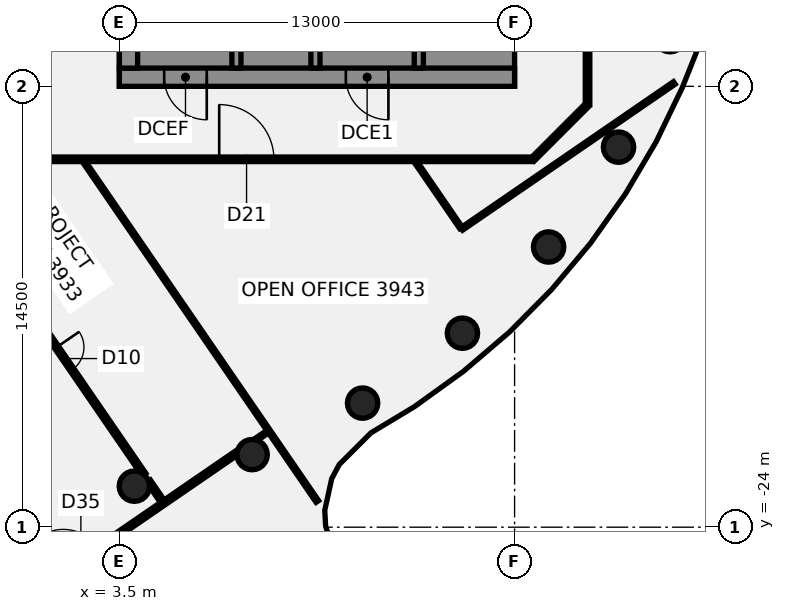
"""IFC4 building model, lengths in metres.
Left out: names, types, materials, properties, quantities, classifications, styles, units other than length and angle.
Written with IfcOpenShell. Run it as: python <this file> out.ifc"""

import sys

from ifc_helpers import new_model, si_unit, direction, frame, frame_2d, origin, origin_2d, place, context, subcontext, project, spatial, polyline, rectangle, circle, outline, extrude, element, fill, save


model = new_model("IFC4")
c1 = context("Model", 3, precision=1e-05, world=origin(), true_north=direction((0.0, 1.0)))
c2 = subcontext(c1, "Body", "Model", "MODEL_VIEW")
j1 = project(units=[si_unit("LENGTHUNIT", "METRE"), si_unit("PLANEANGLEUNIT", "RADIAN")], contexts=[c1])
p1 = place(None, origin())
s1 = spatial("IfcSite", under=j1, at=p1, CompositionType="ELEMENT")
p2 = place(p1, origin())
s2 = spatial("IfcBuilding", under=s1, at=p2, CompositionType="ELEMENT")
p3 = place(p2, frame((0.0, 0.0, 159.25)))
s3 = spatial("IfcBuildingStorey", under=s2, at=p3, CompositionType="ELEMENT", Elevation=159.25)
for number, where, z_axis, x_axis in (
    (1, (3.994, -22.651, -0.14), (0.0, 0.0, 1.0), (1.0, 0.0, 0.0)),
    (2, (7.866, -21.613, -0.14), (0.0, 0.0, 1.0), (1.0, 0.0, 0.0)),
    (3, (11.5, -19.919, -0.14), (0.0, 0.0, 1.0), (1.0, 0.0, 0.0)),
    (4, (14.784, -17.619, -0.14), (0.0, 0.0, 1.0), (1.0, 0.0, 0.0)),
    (5, (17.619, -14.784, -0.14), (0.0, 0.0, 1.0), (1.0, 0.0, 0.0)),
    (6, (19.919, -11.5, -0.14), (0.0, 0.0, 1.0), (1.0, 0.0, 0.0)),
):
    element("IfcColumn", number, at=place(p3, frame(where, z_axis=z_axis, x_axis=x_axis)), inside=s3, PredefinedType="COLUMN", context=c2, shape_type="SweptSolid", body=[
        extrude(circle(Radius=0.5, at=origin_2d()), origin(), (0.0, 0.0, 1.0), 3.75),
    ])
p4 = place(p3, frame((-2.743, -11.999, 0.0), z_axis=(0.0, 0.0, 1.0), x_axis=(0.566083821622, -0.824347685687, 0.0)))
e7 = element("IfcWall", 7, at=p4, inside=s3, PredefinedType="PARTITIONING", context=c2, shape_type="SweptSolid", body=[
    extrude(rectangle(XDim=12.459, YDim=0.15, at=frame_2d((6.229, 0.0))), origin(), (0.0, 0.0, 1.0), 3.01),
])
p5 = place(p4, frame((7.38, 0.0, 0.0)))
e8 = element("IfcOpeningElement", 8, at=p5, cuts=e7, PredefinedType="OPENING", context=c2, shape_type="SweptSolid", body=[
    extrude(rectangle(XDim=0.9, YDim=2.1, at=frame_2d((0.45, 1.05))), frame((0.0, 0.085, 0.0), z_axis=(0.0, -1.0, 0.0), x_axis=(1.0, 0.0, 0.0)), (0.0, 0.0, 1.0), 0.17),
])
p6 = place(p3, frame((4.461, -22.49, 0.0), z_axis=(0.0, 0.0, 1.0), x_axis=(0.566109769755, -0.824329866369, 0.0)))
e9 = element("IfcWall", 9, at=p6, inside=s3, PredefinedType="PARTITIONING", context=c2, shape_type="SweptSolid", body=[
    extrude(rectangle(XDim=0.791, YDim=0.15, at=frame_2d((0.396, 0.0))), origin(), (0.0, 0.0, 1.0), 3.01),
])
p7 = place(p3, frame((2.344, -11.987, 0.0), z_axis=(0.0, 0.0, 1.0), x_axis=(0.566059881592, -0.824364124918, 0.0)))
e10 = element("IfcWall", 10, at=p7, inside=s3, PredefinedType="PARTITIONING", context=c2, shape_type="SweptSolid", body=[
    extrude(rectangle(XDim=13.547, YDim=0.1, at=frame_2d((6.773, 0.0))), origin(), (0.0, 0.0, 1.0), 3.01),
])
p8 = place(p3, frame((13.249, -11.987, 0.0), z_axis=(0.0, 0.0, 1.0), x_axis=(0.566181157167, -0.824280836408, 0.0)))
e11 = element("IfcWall", 11, at=p8, inside=s3, PredefinedType="PARTITIONING", context=c2, shape_type="SweptSolid", body=[
    extrude(rectangle(XDim=2.623, YDim=0.1, at=frame_2d((1.312, 0.0))), origin(), (0.0, 0.0, 1.0), 3.01),
])
p9 = place(p3, frame((-17.1, -11.9, 0.0), z_axis=(0.0, 0.0, 1.0), x_axis=(1.0, 0.0, 0.0)))
e12 = element("IfcWall", 12, at=p9, inside=s3, PredefinedType="PARTITIONING", context=c2, shape_type="SweptSolid", body=[
    extrude(rectangle(XDim=34.165, YDim=0.15, at=frame_2d((17.083, 0.0))), origin(), (0.0, 0.0, 1.0), 3.01),
])
p10 = place(p9, frame((9.777, 0.0, 0.0)))
e13 = element("IfcOpeningElement", 13, at=p10, cuts=e12, PredefinedType="OPENING", context=c2, shape_type="SweptSolid", body=[
    extrude(rectangle(XDim=1.8, YDim=2.1, at=frame_2d((0.9, 1.05))), frame((0.0, 0.085, 0.0), z_axis=(0.0, -1.0, 0.0), x_axis=(1.0, 0.0, 0.0)), (0.0, 0.0, 1.0), 0.17),
])
p11 = place(p9, frame((1.95, 0.0, 0.0)))
e14 = element("IfcOpeningElement", 14, at=p11, cuts=e12, PredefinedType="OPENING", context=c2, shape_type="SweptSolid", body=[
    extrude(rectangle(XDim=1.8, YDim=2.1, at=frame_2d((0.9, 1.05))), frame((0.0, 0.085, 0.0), z_axis=(0.0, -1.0, 0.0), x_axis=(1.0, 0.0, 0.0)), (0.0, 0.0, 1.0), 0.17),
])
p12 = place(p9, frame((23.884, 0.0, 0.0)))
e15 = element("IfcOpeningElement", 15, at=p12, cuts=e12, PredefinedType="OPENING", context=c2, shape_type="SweptSolid", body=[
    extrude(rectangle(XDim=1.8, YDim=2.1, at=frame_2d((0.9, 1.05))), frame((0.0, 0.085, 0.0), z_axis=(0.0, -1.0, 0.0), x_axis=(1.0, 0.0, 0.0)), (0.0, 0.0, 1.0), 0.17),
])
p13 = place(p3, frame((-3.371, -28.925, 0.0), z_axis=(0.0, 0.0, 1.0), x_axis=(0.82439699271, 0.566012012603, 0.0)))
e16 = element("IfcWall", 16, at=p13, inside=s3, PredefinedType="PARTITIONING", context=c2, shape_type="SweptSolid", body=[
    extrude(rectangle(XDim=13.034, YDim=0.15, at=frame_2d((6.517, 0.0))), origin(), (0.0, 0.0, 1.0), 3.01),
])
p14 = place(p13, frame((6.099, 0.0, 0.0)))
e17 = element("IfcOpeningElement", 17, at=p14, cuts=e16, PredefinedType="OPENING", context=c2, shape_type="SweptSolid", body=[
    extrude(rectangle(XDim=1.4, YDim=2.1, at=frame_2d((0.7, 1.05))), frame((0.0, 0.085, 0.0), z_axis=(0.0, -1.0, 0.0), x_axis=(1.0, 0.0, 0.0)), (0.0, 0.0, 1.0), 0.17),
])
p15 = place(p3, frame((7.977, -21.133, 0.0), z_axis=(0.0, 0.0, 1.0), x_axis=(0.824587344579, 0.565734664981, 0.0)))
e18 = element("IfcWall", 18, at=p15, inside=s3, PredefinedType="PARTITIONING", context=c2, shape_type="SweptSolid", body=[
    extrude(rectangle(XDim=0.483, YDim=0.1, at=frame_2d((0.241, 0.0))), origin(), (0.0, 0.0, 1.0), 3.01),
])
p16 = place(p3, frame((14.762, -14.19, 0.0), z_axis=(0.0, 0.0, 1.0), x_axis=(0.824347457756, 0.566084153542, 0.0)))
e19 = element("IfcWall", 19, at=p16, inside=s3, PredefinedType="PARTITIONING", context=c2, shape_type="SweptSolid", body=[
    extrude(rectangle(XDim=8.483, YDim=0.1, at=frame_2d((4.242, 0.0))), origin(), (0.0, 0.0, 1.0), 3.01),
])
p17 = place(p3, frame((17.1, -11.9, 0.0), z_axis=(0.0, 0.0, 1.0), x_axis=(0.707106781187, 0.707106781187, 0.0)))
e20 = element("IfcWall", 20, at=p17, inside=s3, PredefinedType="PARTITIONING", context=c2, shape_type="SweptSolid", body=[
    extrude(rectangle(XDim=2.505, YDim=0.15, at=frame_2d((1.253, 0.0))), origin(), (0.0, 0.0, 1.0), 3.01),
])
p18 = place(p3, frame((18.9, -10.1, 0.0), z_axis=(0.0, 0.0, 1.0), x_axis=(0.0, 1.0, 0.0)))
e21 = element("IfcWall", 21, at=p18, inside=s3, PredefinedType="PARTITIONING", context=c2, shape_type="SweptSolid", body=[
    extrude(rectangle(XDim=20.2, YDim=0.15, at=frame_2d((10.1, 0.0))), origin(), (0.0, 0.0, 1.0), 3.01),
])
p19 = place(p18, frame((8.047, 0.0, 0.0)))
e22 = element("IfcOpeningElement", 22, at=p19, cuts=e21, PredefinedType="OPENING", context=c2, shape_type="SweptSolid", body=[
    extrude(rectangle(XDim=1.8, YDim=2.1, at=frame_2d((0.9, 1.05))), frame((0.0, 0.085, 0.0), z_axis=(0.0, -1.0, 0.0), x_axis=(1.0, 0.0, 0.0)), (0.0, 0.0, 1.0), 0.17),
])
p20 = place(p18, frame((13.596, 0.0, 0.0)))
e23 = element("IfcOpeningElement", 23, at=p20, cuts=e21, PredefinedType="OPENING", context=c2, shape_type="SweptSolid", body=[
    extrude(rectangle(XDim=0.9, YDim=2.1, at=frame_2d((0.45, 1.05))), frame((0.0, 0.085, 0.0), z_axis=(0.0, -1.0, 0.0), x_axis=(1.0, 0.0, 0.0)), (0.0, 0.0, 1.0), 0.17),
])
p21 = place(p3, frame((16.5, -9.2, 0.0), z_axis=(0.0, 0.0, 1.0), x_axis=(-1.0, 0.0, 0.0)))
e24 = element("IfcWall", 24, at=p21, inside=s3, PredefinedType="SHEAR", context=c2, shape_type="SweptSolid", body=[
    extrude(rectangle(XDim=13.0, YDim=0.6, at=frame_2d((6.5, 0.0))), origin(), (0.0, 0.0, 1.0), 3.61),
])
p22 = place(p21, frame((4.15, 0.0, 0.0)))
e25 = element("IfcOpeningElement", 25, at=p22, cuts=e24, PredefinedType="OPENING", context=c2, shape_type="SweptSolid", body=[
    extrude(rectangle(XDim=1.4, YDim=2.1, at=frame_2d((0.7, 1.05))), frame((0.0, 0.31, 0.0), z_axis=(0.0, -1.0, 0.0), x_axis=(1.0, 0.0, 0.0)), (0.0, 0.0, 1.0), 0.62),
])
p23 = place(p21, frame((10.125, 0.0, 0.0)))
e26 = element("IfcOpeningElement", 26, at=p23, cuts=e24, PredefinedType="OPENING", context=c2, shape_type="SweptSolid", body=[
    extrude(rectangle(XDim=1.4, YDim=2.1, at=frame_2d((0.7, 1.05))), frame((0.0, 0.31, 0.0), z_axis=(0.0, -1.0, 0.0), x_axis=(1.0, 0.0, 0.0)), (0.0, 0.0, 1.0), 0.62),
])
p24 = place(p3, origin())
e27 = element("IfcWall", 27, at=p24, inside=s3, PredefinedType="SHEAR", context=c2, shape_type="SweptSolid", body=[
    extrude(outline(polyline([(13.5, -8.125), (13.5, -8.9), (15.9, -8.9), (16.5, -8.9), (16.5, 8.9), (15.9, 8.9), (13.5, 8.9), (13.5, 8.125), (15.9, 8.125), (15.9, 5.625), (13.5, 5.625), (13.5, 5.375), (15.9, 5.375), (15.9, -5.375), (13.5, -5.375), (13.5, -5.625), (15.9, -5.625), (15.9, -8.125), (13.5, -8.125)])), origin(), (0.0, 0.0, 1.0), 3.61),
])
p25 = place(p3, origin())
e28 = element("IfcWall", 28, at=p25, inside=s3, PredefinedType="SHEAR", context=c2, shape_type="SweptSolid", body=[
    extrude(outline(polyline([(7.5, -8.125), (7.5, -8.9), (9.8, -8.9), (9.8, -8.125), (9.8, -5.625), (9.55, -5.625), (9.55, -8.125), (7.5, -8.125)])), origin(), (0.0, 0.0, 1.0), 3.61),
])
p26 = place(p3, frame((7.35, -8.9, 0.0), z_axis=(0.0, 0.0, 1.0), x_axis=(0.0, 1.0, 0.0)))
e29 = element("IfcWall", 29, at=p26, inside=s3, PredefinedType="SHEAR", context=c2, shape_type="SweptSolid", body=[
    extrude(rectangle(XDim=0.775, YDim=0.3, at=frame_2d((0.387, 0.0))), origin(), (0.0, 0.0, 1.0), 3.61),
])
p27 = place(p3, frame((13.35, -8.9, 0.0), z_axis=(0.0, 0.0, 1.0), x_axis=(0.0, 1.0, 0.0)))
e30 = element("IfcWall", 30, at=p27, inside=s3, PredefinedType="SHEAR", context=c2, shape_type="SweptSolid", body=[
    extrude(rectangle(XDim=17.8, YDim=0.3, at=frame_2d((8.9, 0.0))), origin(), (0.0, 0.0, 1.0), 3.61),
])
p28 = place(p27, frame((1.325, 0.0, 0.0)))
e31 = element("IfcOpeningElement", 31, at=p28, cuts=e30, PredefinedType="OPENING", context=c2, shape_type="SweptSolid", body=[
    extrude(rectangle(XDim=1.4, YDim=2.1, at=frame_2d((0.7, 1.05))), frame((0.0, 0.16, 0.0), z_axis=(0.0, -1.0, 0.0), x_axis=(1.0, 0.0, 0.0)), (0.0, 0.0, 1.0), 0.32),
])
p29 = place(p27, frame((4.754, 0.0, 0.0)))
e32 = element("IfcOpeningElement", 32, at=p29, cuts=e30, PredefinedType="OPENING", context=c2, shape_type="SweptSolid", body=[
    extrude(rectangle(XDim=1.0, YDim=2.1, at=frame_2d((0.5, 1.05))), frame((0.0, 0.16, 0.0), z_axis=(0.0, -1.0, 0.0), x_axis=(1.0, 0.0, 0.0)), (0.0, 0.0, 1.0), 0.32),
])
p30 = place(p27, frame((10.254, 0.0, 0.0)))
e33 = element("IfcOpeningElement", 33, at=p30, cuts=e30, PredefinedType="OPENING", context=c2, shape_type="SweptSolid", body=[
    extrude(rectangle(XDim=1.0, YDim=2.1, at=frame_2d((0.5, 1.05))), frame((0.0, 0.16, 0.0), z_axis=(0.0, -1.0, 0.0), x_axis=(1.0, 0.0, 0.0)), (0.0, 0.0, 1.0), 0.32),
])
p31 = place(p3, frame((9.95, -8.9, 0.0), z_axis=(0.0, 0.0, 1.0), x_axis=(0.0, 1.0, 0.0)))
e34 = element("IfcWall", 34, at=p31, inside=s3, PredefinedType="SHEAR", context=c2, shape_type="SweptSolid", body=[
    extrude(rectangle(XDim=17.8, YDim=0.3, at=frame_2d((8.9, 0.0))), origin(), (0.0, 0.0, 1.0), 3.61),
])
p32 = place(p31, frame((4.175, 0.0, 0.0)))
e35 = element("IfcOpeningElement", 35, at=p32, cuts=e34, PredefinedType="OPENING", context=c2, shape_type="SweptSolid", body=[
    extrude(rectangle(XDim=1.2, YDim=2.1, at=frame_2d((0.6, 1.05))), frame((0.0, 0.16, 0.0), z_axis=(0.0, -1.0, 0.0), x_axis=(1.0, 0.0, 0.0)), (0.0, 0.0, 1.0), 0.32),
])
p33 = place(p31, frame((6.925, 0.0, 0.0)))
e36 = element("IfcOpeningElement", 36, at=p33, cuts=e34, PredefinedType="OPENING", context=c2, shape_type="SweptSolid", body=[
    extrude(rectangle(XDim=1.2, YDim=2.1, at=frame_2d((0.6, 1.05))), frame((0.0, 0.16, 0.0), z_axis=(0.0, -1.0, 0.0), x_axis=(1.0, 0.0, 0.0)), (0.0, 0.0, 1.0), 0.32),
])
p34 = place(p3, frame((3.8, -8.9, 0.0), z_axis=(0.0, 0.0, 1.0), x_axis=(0.0, 1.0, 0.0)))
e37 = element("IfcWall", 37, at=p34, inside=s3, PredefinedType="SHEAR", context=c2, shape_type="SweptSolid", body=[
    extrude(rectangle(XDim=17.8, YDim=0.6, at=frame_2d((8.9, 0.0))), origin(), (0.0, 0.0, 1.0), 3.61),
])
p35 = place(p34, frame((1.25, 0.0, 0.0)))
e38 = element("IfcOpeningElement", 38, at=p35, cuts=e37, PredefinedType="OPENING", context=c2, shape_type="SweptSolid", body=[
    extrude(rectangle(XDim=1.8, YDim=2.1, at=frame_2d((0.9, 1.05))), frame((0.0, 0.31, 0.0), z_axis=(0.0, -1.0, 0.0), x_axis=(1.0, 0.0, 0.0)), (0.0, 0.0, 1.0), 0.62),
])
p36 = place(p34, frame((12.377, 0.0, 0.0)))
e39 = element("IfcOpeningElement", 39, at=p36, cuts=e37, PredefinedType="OPENING", context=c2, shape_type="SweptSolid", body=[
    extrude(rectangle(XDim=1.0, YDim=2.1, at=frame_2d((0.5, 1.05))), frame((0.0, 0.31, 0.0), z_axis=(0.0, -1.0, 0.0), x_axis=(1.0, 0.0, 0.0)), (0.0, 0.0, 1.0), 0.62),
])
p37 = place(p34, frame((15.903, 0.0, 0.0)))
e40 = element("IfcOpeningElement", 40, at=p37, cuts=e37, PredefinedType="OPENING", context=c2, shape_type="SweptSolid", body=[
    extrude(rectangle(XDim=1.0, YDim=2.1, at=frame_2d((0.5, 1.05))), frame((0.0, 0.31, 0.0), z_axis=(0.0, -1.0, 0.0), x_axis=(1.0, 0.0, 0.0)), (0.0, 0.0, 1.0), 0.62),
])
p38 = place(p5, origin())
e41 = element("IfcDoor", 41, at=p38, inside=s3, OperationType="SINGLE_SWING_LEFT", PredefinedType="DOOR", context=c2, shape_type="SweptSolid", body=[
    extrude(rectangle(XDim=0.9, YDim=2.1, at=frame_2d((0.45, 1.05))), frame((0.0, 0.025, 0.0), z_axis=(0.0, -1.0, 0.0), x_axis=(1.0, 0.0, 0.0)), (0.0, 0.0, 1.0), 0.05),
])
fill(e8, e41)
p39 = place(p12, frame((1.8, 0.0, 0.0), z_axis=(0.0, 0.0, 1.0), x_axis=(-1.0, 0.0, 0.0)))
e42 = element("IfcDoor", 42, at=p39, inside=s3, OperationType="DOUBLE_DOOR_SINGLE_SWING", PredefinedType="DOOR", context=c2, shape_type="SweptSolid", body=[
    extrude(rectangle(XDim=1.8, YDim=2.1, at=frame_2d((0.9, 1.05))), frame((0.0, 0.025, 0.0), z_axis=(0.0, -1.0, 0.0), x_axis=(1.0, 0.0, 0.0)), (0.0, 0.0, 1.0), 0.05),
])
fill(e15, e42)
p40 = place(p22, origin())
e43 = element("IfcDoor", 43, at=p40, inside=s3, OperationType="SINGLE_SWING_LEFT", PredefinedType="DOOR", context=c2, shape_type="SweptSolid", body=[
    extrude(rectangle(XDim=1.4, YDim=2.1, at=frame_2d((0.7, 1.05))), frame((0.0, 0.025, 0.0), z_axis=(0.0, -1.0, 0.0), x_axis=(1.0, 0.0, 0.0)), (0.0, 0.0, 1.0), 0.05),
])
fill(e25, e43)
p41 = place(p23, origin())
e44 = element("IfcDoor", 44, at=p41, inside=s3, OperationType="SINGLE_SWING_LEFT", PredefinedType="DOOR", context=c2, shape_type="SweptSolid", body=[
    extrude(rectangle(XDim=1.4, YDim=2.1, at=frame_2d((0.7, 1.05))), frame((0.0, 0.025, 0.0), z_axis=(0.0, -1.0, 0.0), x_axis=(1.0, 0.0, 0.0)), (0.0, 0.0, 1.0), 0.05),
])
fill(e26, e44)
save(model, sys.argv[1])
